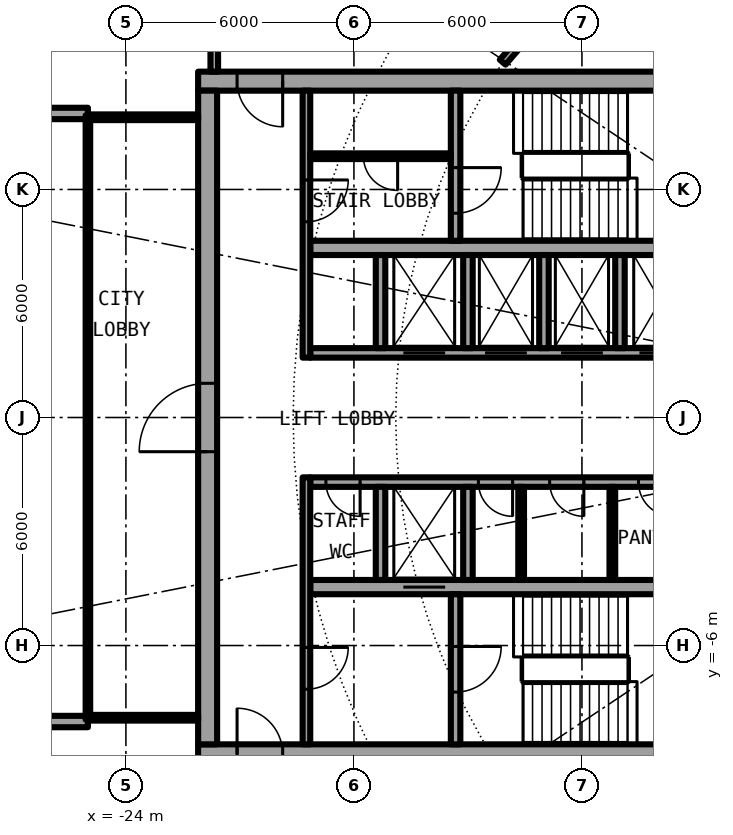
"""IFC4 building model, lengths in metres.
Left out: names, types, materials, properties, quantities, classifications, styles, units other than length and angle.
Written with IfcOpenShell. Run it as: python <this file> out.ifc"""

import sys

from ifc_helpers import new_model, si_unit, direction, frame, frame_2d, origin, place, context, subcontext, project, spatial, rectangle, extrude, element, fill, save


model = new_model("IFC4")
c1 = context("Model", 3, precision=1e-05, world=origin(), true_north=direction((0.0, 1.0)))
c2 = subcontext(c1, "Body", "Model", "MODEL_VIEW")
j1 = project(units=[si_unit("LENGTHUNIT", "METRE"), si_unit("PLANEANGLEUNIT", "RADIAN")], contexts=[c1])
p1 = place(None, origin())
s1 = spatial("IfcSite", under=j1, at=p1, CompositionType="ELEMENT")
p2 = place(p1, origin())
s2 = spatial("IfcBuilding", under=s1, at=p2, CompositionType="ELEMENT")
p3 = place(p2, frame((0.0, 0.0, 157.4)))
s3 = spatial("IfcBuildingStorey", under=s2, at=p3, CompositionType="ELEMENT", Elevation=157.4)
for number, where, z_axis, x_axis in (
    (1, (-25.0, 8.0, 0.0), (0.0, 0.0, 1.0), (-1.0, 0.0, 0.0)),
    (2, (-25.0, -8.0, 0.0), (0.0, 0.0, 1.0), (-1.0, 0.0, 0.0)),
):
    element("IfcWall", number, at=place(p3, frame(where, z_axis=z_axis, x_axis=x_axis)), inside=s3, PredefinedType="SOLIDWALL", context=c2, shape_type="SweptSolid", body=[
        extrude(rectangle(XDim=2.667, YDim=0.3, at=frame_2d((1.333, 0.0))), origin(), (0.0, 0.0, 1.0), 3.85),
    ])
p4 = place(p3, frame((-22.1, -8.85, 0.0), z_axis=(0.0, 0.0, 1.0), x_axis=(1.0, 0.0, 0.0)))
e3 = element("IfcWall", 3, at=p4, inside=s3, PredefinedType="SHEAR", context=c2, shape_type="SweptSolid", body=[
    extrude(rectangle(XDim=13.6, YDim=0.5, at=frame_2d((6.8, 0.0))), origin(), (0.0, 0.0, 1.0), 4.2),
])
p5 = place(p4, frame((1.025, 0.0, 0.0)))
e4 = element("IfcOpeningElement", 4, at=p5, cuts=e3, PredefinedType="OPENING", context=c2, shape_type="SweptSolid", body=[
    extrude(rectangle(XDim=1.2, YDim=2.3, at=frame_2d((0.6, 1.15))), frame((0.0, 0.26, 0.0), z_axis=(0.0, -1.0, 0.0), x_axis=(1.0, 0.0, 0.0)), (0.0, 0.0, 1.0), 0.52),
])
p6 = place(p3, frame((-8.5, 8.85, 0.0), z_axis=(0.0, 0.0, 1.0), x_axis=(-1.0, 0.0, 0.0)))
e5 = element("IfcWall", 5, at=p6, inside=s3, PredefinedType="SHEAR", context=c2, shape_type="SweptSolid", body=[
    extrude(rectangle(XDim=13.6, YDim=0.5, at=frame_2d((6.8, 0.0))), origin(), (0.0, 0.0, 1.0), 4.2),
])
p7 = place(p6, frame((11.375, 0.0, 0.0)))
e6 = element("IfcOpeningElement", 6, at=p7, cuts=e5, PredefinedType="OPENING", context=c2, shape_type="SweptSolid", body=[
    extrude(rectangle(XDim=1.2, YDim=2.3, at=frame_2d((0.6, 1.15))), frame((0.0, 0.26, 0.0), z_axis=(0.0, -1.0, 0.0), x_axis=(1.0, 0.0, 0.0)), (0.0, 0.0, 1.0), 0.52),
])
p8 = place(p3, frame((-21.85, -8.6, 0.0), z_axis=(0.0, 0.0, 1.0), x_axis=(0.0, 1.0, 0.0)))
e7 = element("IfcWall", 7, at=p8, inside=s3, PredefinedType="SHEAR", context=c2, shape_type="SweptSolid", body=[
    extrude(rectangle(XDim=17.2, YDim=0.5, at=frame_2d((8.6, 0.0))), origin(), (0.0, 0.0, 1.0), 4.2),
])
p9 = place(p8, frame((7.7, 0.0, 0.0)))
e8 = element("IfcOpeningElement", 8, at=p9, cuts=e7, PredefinedType="OPENING", context=c2, shape_type="SweptSolid", body=[
    extrude(rectangle(XDim=1.8, YDim=2.3, at=frame_2d((0.9, 1.15))), frame((0.0, 0.26, 0.0), z_axis=(0.0, -1.0, 0.0), x_axis=(1.0, 0.0, 0.0)), (0.0, 0.0, 1.0), 0.52),
])
p10 = place(p3, frame((-9.0, -1.7, 0.0), z_axis=(0.0, 0.0, 1.0), x_axis=(-1.0, 0.0, 0.0)))
e9 = element("IfcWall", 9, at=p10, inside=s3, PredefinedType="SHEAR", context=c2, shape_type="SweptSolid", body=[
    extrude(rectangle(XDim=10.15, YDim=0.25, at=frame_2d((5.075, 0.0))), origin(), (0.0, 0.0, 1.0), 4.2),
])
p11 = place(p10, frame((0.613, 0.0, 0.0)))
e10 = element("IfcOpeningElement", 10, at=p11, cuts=e9, PredefinedType="OPENING", context=c2, shape_type="SweptSolid", body=[
    extrude(rectangle(XDim=0.9, YDim=2.3, at=frame_2d((0.45, 1.15))), frame((0.0, 0.135, 0.0), z_axis=(0.0, -1.0, 0.0), x_axis=(1.0, 0.0, 0.0)), (0.0, 0.0, 1.0), 0.27),
])
p12 = place(p10, frame((2.95, 0.0, 0.0)))
e11 = element("IfcOpeningElement", 11, at=p12, cuts=e9, PredefinedType="OPENING", context=c2, shape_type="SweptSolid", body=[
    extrude(rectangle(XDim=0.9, YDim=2.3, at=frame_2d((0.45, 1.15))), frame((0.0, 0.135, 0.0), z_axis=(0.0, -1.0, 0.0), x_axis=(1.0, 0.0, 0.0)), (0.0, 0.0, 1.0), 0.27),
])
p13 = place(p10, frame((4.825, 0.0, 0.0)))
e12 = element("IfcOpeningElement", 12, at=p13, cuts=e9, PredefinedType="OPENING", context=c2, shape_type="SweptSolid", body=[
    extrude(rectangle(XDim=0.9, YDim=2.3, at=frame_2d((0.45, 1.15))), frame((0.0, 0.135, 0.0), z_axis=(0.0, -1.0, 0.0), x_axis=(1.0, 0.0, 0.0)), (0.0, 0.0, 1.0), 0.27),
])
p14 = place(p10, frame((8.837, 0.0, 0.0)))
e13 = element("IfcOpeningElement", 13, at=p14, cuts=e9, PredefinedType="OPENING", context=c2, shape_type="SweptSolid", body=[
    extrude(rectangle(XDim=0.9, YDim=2.3, at=frame_2d((0.45, 1.15))), frame((0.0, 0.135, 0.0), z_axis=(0.0, -1.0, 0.0), x_axis=(1.0, 0.0, 0.0)), (0.0, 0.0, 1.0), 0.27),
])
p15 = place(p3, frame((-9.0, -4.462, 0.0), z_axis=(0.0, 0.0, 1.0), x_axis=(-1.0, 0.0, 0.0)))
e14 = element("IfcWall", 14, at=p15, inside=s3, PredefinedType="SHEAR", context=c2, shape_type="SweptSolid", body=[
    extrude(rectangle(XDim=10.15, YDim=0.375, at=frame_2d((5.075, 0.0))), origin(), (0.0, 0.0, 1.0), 4.2),
])
p16 = place(p15, frame((6.6, 0.0, 0.0)))
e15 = element("IfcOpeningElement", 15, at=p16, cuts=e14, PredefinedType="OPENING", context=c2, shape_type="SweptSolid", body=[
    extrude(rectangle(XDim=1.1, YDim=2.3, at=frame_2d((0.55, 1.15))), frame((0.0, 0.198, 0.0), z_axis=(0.0, -1.0, 0.0), x_axis=(1.0, 0.0, 0.0)), (0.0, 0.0, 1.0), 0.395),
])
p17 = place(p3, frame((-15.325, -4.65, 0.0), z_axis=(0.0, 0.0, 1.0), x_axis=(0.0, -1.0, 0.0)))
e16 = element("IfcWall", 16, at=p17, inside=s3, PredefinedType="SHEAR", context=c2, shape_type="SweptSolid", body=[
    extrude(rectangle(XDim=3.95, YDim=0.25, at=frame_2d((1.975, 0.0))), origin(), (0.0, 0.0, 1.0), 4.2),
])
p18 = place(p17, frame((1.375, 0.0, 0.0)))
e17 = element("IfcOpeningElement", 17, at=p18, cuts=e16, PredefinedType="OPENING", context=c2, shape_type="SweptSolid", body=[
    extrude(rectangle(XDim=1.2, YDim=2.3, at=frame_2d((0.6, 1.15))), frame((0.0, 0.135, 0.0), z_axis=(0.0, -1.0, 0.0), x_axis=(1.0, 0.0, 0.0)), (0.0, 0.0, 1.0), 0.27),
])
for number, where, z_axis, x_axis in (
    (18, (-15.0, -1.825, 0.0), (0.0, 0.0, 1.0), (0.0, -1.0, 0.0)),
    (19, (-17.3, -1.825, 0.0), (0.0, 0.0, 1.0), (0.0, -1.0, 0.0)),
):
    element("IfcWall", number, at=place(p3, frame(where, z_axis=z_axis, x_axis=x_axis)), inside=s3, PredefinedType="SOLIDWALL", context=c2, shape_type="SweptSolid", body=[
        extrude(rectangle(XDim=2.45, YDim=0.25, at=frame_2d((1.225, 0.0))), origin(), (0.0, 0.0, 1.0), 3.85),
    ])
p19 = place(p3, frame((-19.25, -1.575, 0.0), z_axis=(0.0, 0.0, 1.0), x_axis=(0.0, -1.0, 0.0)))
e20 = element("IfcWall", 20, at=p19, inside=s3, PredefinedType="SOLIDWALL", context=c2, shape_type="SweptSolid", body=[
    extrude(rectangle(XDim=7.025, YDim=0.2, at=frame_2d((3.513, 0.0))), origin(), (0.0, 0.0, 1.0), 3.85),
])
p20 = place(p19, frame((4.475, 0.0, 0.0)))
e21 = element("IfcOpeningElement", 21, at=p20, cuts=e20, PredefinedType="OPENING", context=c2, shape_type="SweptSolid", body=[
    extrude(rectangle(XDim=1.1, YDim=2.3, at=frame_2d((0.55, 1.15))), frame((0.0, 0.11, 0.0), z_axis=(0.0, -1.0, 0.0), x_axis=(1.0, 0.0, 0.0)), (0.0, 0.0, 1.0), 0.22),
])
p21 = place(p3, frame((-9.0, 1.7, 0.0), z_axis=(0.0, 0.0, 1.0), x_axis=(-1.0, 0.0, 0.0)))
e22 = element("IfcWall", 22, at=p21, inside=s3, PredefinedType="SHEAR", context=c2, shape_type="SweptSolid", body=[
    extrude(rectangle(XDim=10.15, YDim=0.25, at=frame_2d((5.075, 0.0))), origin(), (0.0, 0.0, 1.0), 4.2),
])
p22 = place(p21, frame((0.387, 0.0, 0.0)))
e23 = element("IfcOpeningElement", 23, at=p22, cuts=e22, PredefinedType="OPENING", context=c2, shape_type="SweptSolid", body=[
    extrude(rectangle(XDim=1.1, YDim=2.3, at=frame_2d((0.55, 1.15))), frame((0.0, 0.135, 0.0), z_axis=(0.0, -1.0, 0.0), x_axis=(1.0, 0.0, 0.0)), (0.0, 0.0, 1.0), 0.27),
])
p23 = place(p21, frame((2.45, 0.0, 0.0)))
e24 = element("IfcOpeningElement", 24, at=p23, cuts=e22, PredefinedType="OPENING", context=c2, shape_type="SweptSolid", body=[
    extrude(rectangle(XDim=1.1, YDim=2.3, at=frame_2d((0.55, 1.15))), frame((0.0, 0.135, 0.0), z_axis=(0.0, -1.0, 0.0), x_axis=(1.0, 0.0, 0.0)), (0.0, 0.0, 1.0), 0.27),
])
p24 = place(p21, frame((4.45, 0.0, 0.0)))
e25 = element("IfcOpeningElement", 25, at=p24, cuts=e22, PredefinedType="OPENING", context=c2, shape_type="SweptSolid", body=[
    extrude(rectangle(XDim=1.1, YDim=2.3, at=frame_2d((0.55, 1.15))), frame((0.0, 0.135, 0.0), z_axis=(0.0, -1.0, 0.0), x_axis=(1.0, 0.0, 0.0)), (0.0, 0.0, 1.0), 0.27),
])
p25 = place(p21, frame((6.6, 0.0, 0.0)))
e26 = element("IfcOpeningElement", 26, at=p25, cuts=e22, PredefinedType="OPENING", context=c2, shape_type="SweptSolid", body=[
    extrude(rectangle(XDim=1.1, YDim=2.3, at=frame_2d((0.55, 1.15))), frame((0.0, 0.135, 0.0), z_axis=(0.0, -1.0, 0.0), x_axis=(1.0, 0.0, 0.0)), (0.0, 0.0, 1.0), 0.27),
])
p26 = place(p3, frame((-9.0, 4.462, 0.0), z_axis=(0.0, 0.0, 1.0), x_axis=(-1.0, 0.0, 0.0)))
e27 = element("IfcWall", 27, at=p26, inside=s3, PredefinedType="SHEAR", context=c2, shape_type="SweptSolid", body=[
    extrude(rectangle(XDim=10.15, YDim=0.375, at=frame_2d((5.075, 0.0))), origin(), (0.0, 0.0, 1.0), 4.2),
])
p27 = place(p3, frame((-15.325, 8.6, 0.0), z_axis=(0.0, 0.0, 1.0), x_axis=(0.0, -1.0, 0.0)))
e28 = element("IfcWall", 28, at=p27, inside=s3, PredefinedType="SHEAR", context=c2, shape_type="SweptSolid", body=[
    extrude(rectangle(XDim=3.95, YDim=0.25, at=frame_2d((1.975, 0.0))), origin(), (0.0, 0.0, 1.0), 4.2),
])
p28 = place(p27, frame((2.025, 0.0, 0.0)))
e29 = element("IfcOpeningElement", 29, at=p28, cuts=e28, PredefinedType="OPENING", context=c2, shape_type="SweptSolid", body=[
    extrude(rectangle(XDim=1.2, YDim=2.3, at=frame_2d((0.6, 1.15))), frame((0.0, 0.135, 0.0), z_axis=(0.0, -1.0, 0.0), x_axis=(1.0, 0.0, 0.0)), (0.0, 0.0, 1.0), 0.27),
])
for number, where, z_axis, x_axis in (
    (30, (-15.0, 1.825, 0.0), (0.0, 0.0, 1.0), (0.0, 1.0, 0.0)),
    (31, (-17.3, 1.825, 0.0), (0.0, 0.0, 1.0), (0.0, 1.0, 0.0)),
):
    element("IfcWall", number, at=place(p3, frame(where, z_axis=z_axis, x_axis=x_axis)), inside=s3, PredefinedType="SOLIDWALL", context=c2, shape_type="SweptSolid", body=[
        extrude(rectangle(XDim=2.45, YDim=0.25, at=frame_2d((1.225, 0.0))), origin(), (0.0, 0.0, 1.0), 3.85),
    ])
p29 = place(p3, frame((-19.25, 8.6, 0.0), z_axis=(0.0, 0.0, 1.0), x_axis=(0.0, -1.0, 0.0)))
e32 = element("IfcWall", 32, at=p29, inside=s3, PredefinedType="SOLIDWALL", context=c2, shape_type="SweptSolid", body=[
    extrude(rectangle(XDim=7.025, YDim=0.2, at=frame_2d((3.513, 0.0))), origin(), (0.0, 0.0, 1.0), 3.85),
])
p30 = place(p29, frame((2.35, 0.0, 0.0)))
e33 = element("IfcOpeningElement", 33, at=p30, cuts=e32, PredefinedType="OPENING", context=c2, shape_type="SweptSolid", body=[
    extrude(rectangle(XDim=1.1, YDim=2.3, at=frame_2d((0.55, 1.15))), frame((0.0, 0.11, 0.0), z_axis=(0.0, -1.0, 0.0), x_axis=(1.0, 0.0, 0.0)), (0.0, 0.0, 1.0), 0.22),
])
for number, where, z_axis, x_axis in (
    (34, (-11.0, 1.825, 0.0), (0.0, 0.0, 1.0), (0.0, 1.0, 0.0)),
    (35, (-13.0, 1.825, 0.0), (0.0, 0.0, 1.0), (0.0, 1.0, 0.0)),
):
    element("IfcWall", number, at=place(p3, frame(where, z_axis=z_axis, x_axis=x_axis)), inside=s3, PredefinedType="SOLIDWALL", context=c2, shape_type="SweptSolid", body=[
        extrude(rectangle(XDim=2.45, YDim=0.25, at=frame_2d((1.225, 0.0))), origin(), (0.0, 0.0, 1.0), 3.85),
    ])
for number, where, z_axis, x_axis in (
    (36, (-11.2, -1.825, 0.0), (0.0, 0.0, 1.0), (0.0, -1.0, 0.0)),
    (37, (-13.6, -1.825, 0.0), (0.0, 0.0, 1.0), (0.0, -1.0, 0.0)),
):
    element("IfcWall", number, at=place(p3, frame(where, z_axis=z_axis, x_axis=x_axis)), inside=s3, PredefinedType="PARTITIONING", context=c2, shape_type="SweptSolid", body=[
        extrude(rectangle(XDim=2.45, YDim=0.15, at=frame_2d((1.225, 0.0))), origin(), (0.0, 0.0, 1.0), 3.85),
    ])
p31 = place(p3, frame((-15.45, 6.875, 0.0), z_axis=(0.0, 0.0, 1.0), x_axis=(-1.0, 0.0, 0.0)))
e38 = element("IfcWall", 38, at=p31, inside=s3, PredefinedType="PARTITIONING", context=c2, shape_type="SweptSolid", body=[
    extrude(rectangle(XDim=3.7, YDim=0.15, at=frame_2d((1.85, 0.0))), origin(), (0.0, 0.0, 1.0), 3.85),
])
p32 = place(p31, frame((1.4, 0.0, 0.0)))
e39 = element("IfcOpeningElement", 39, at=p32, cuts=e38, PredefinedType="OPENING", context=c2, shape_type="SweptSolid", body=[
    extrude(rectangle(XDim=0.9, YDim=2.3, at=frame_2d((0.45, 1.15))), frame((0.0, 0.085, 0.0), z_axis=(0.0, -1.0, 0.0), x_axis=(1.0, 0.0, 0.0)), (0.0, 0.0, 1.0), 0.17),
])
for number, where, z_axis, x_axis in (
    (40, (-22.1, 7.9, 0.0), (0.0, 0.0, 1.0), (-1.0, 0.0, 0.0)),
    (41, (-22.1, -7.9, 0.0), (0.0, 0.0, 1.0), (-1.0, 0.0, 0.0)),
):
    element("IfcWall", number, at=place(p3, frame(where, z_axis=z_axis, x_axis=x_axis)), inside=s3, PredefinedType="PARTITIONING", context=c2, shape_type="SweptSolid", body=[
        extrude(rectangle(XDim=2.84, YDim=0.15, at=frame_2d((1.42, 0.0))), origin(), (0.0, 0.0, 1.0), 3.85),
    ])
p33 = place(p3, frame((-25.0, 7.95, 0.0), z_axis=(0.0, 0.0, 1.0), x_axis=(0.0, -1.0, 0.0)))
e42 = element("IfcWall", 42, at=p33, inside=s3, PredefinedType="PARTITIONING", context=c2, shape_type="SweptSolid", body=[
    extrude(rectangle(XDim=15.9, YDim=0.12, at=frame_2d((7.95, 0.0))), origin(), (0.0, 0.0, 1.0), 3.85),
])
p34 = place(p33, frame((0.95, 0.0, 0.1)))
e43 = element("IfcOpeningElement", 43, at=p34, cuts=e42, PredefinedType="OPENING", context=c2, shape_type="SweptSolid", body=[
    extrude(rectangle(XDim=14.0, YDim=3.5, at=frame_2d((7.0, 1.75))), frame((0.0, 0.07, 0.0), z_axis=(0.0, -1.0, 0.0), x_axis=(1.0, 0.0, 0.0)), (0.0, 0.0, 1.0), 0.14),
])
p35 = place(p3, frame((-14.086, 9.35, 0.0), z_axis=(0.0, 0.0, 1.0), x_axis=(0.653273870261, 0.757121687996, 0.0)))
e44 = element("IfcWall", 44, at=p35, inside=s3, PredefinedType="PARTITIONING", context=c2, shape_type="SweptSolid", body=[
    extrude(rectangle(XDim=4.189, YDim=0.2, at=frame_2d((2.095, 0.0))), origin(), (0.0, 0.0, 1.0), 3.85),
])
p36 = place(p35, frame((1.621, 0.0, 0.0)))
e45 = element("IfcOpeningElement", 45, at=p36, cuts=e44, PredefinedType="OPENING", context=c2, shape_type="SweptSolid", body=[
    extrude(rectangle(XDim=1.0, YDim=2.3, at=frame_2d((0.5, 1.15))), frame((0.0, 0.11, 0.0), z_axis=(0.0, -1.0, 0.0), x_axis=(1.0, 0.0, 0.0)), (0.0, 0.0, 1.0), 0.22),
])
p37 = place(p3, frame((-21.675, 9.1, 0.0), z_axis=(0.0, 0.0, 1.0), x_axis=(0.0, 1.0, 0.0)))
e46 = element("IfcWall", 46, at=p37, inside=s3, PredefinedType="PARTITIONING", context=c2, shape_type="SweptSolid", body=[
    extrude(rectangle(XDim=1.75, YDim=0.2, at=frame_2d((0.875, 0.0))), origin(), (0.0, 0.0, 1.0), 3.85),
])
p38 = place(p16, origin())
e47 = element("IfcDoor", 47, at=p38, inside=s3, OperationType="DOUBLE_DOOR_SLIDING", PredefinedType="DOOR", context=c2, shape_type="SweptSolid", body=[
    extrude(rectangle(XDim=1.1, YDim=2.3, at=frame_2d((0.55, 1.15))), frame((0.0, 0.025, 0.0), z_axis=(0.0, -1.0, 0.0), x_axis=(1.0, 0.0, 0.0)), (0.0, 0.0, 1.0), 0.05),
])
fill(e15, e47)
p39 = place(p22, origin())
e48 = element("IfcDoor", 48, at=p39, inside=s3, OperationType="DOUBLE_DOOR_SLIDING", PredefinedType="DOOR", context=c2, shape_type="SweptSolid", body=[
    extrude(rectangle(XDim=1.1, YDim=2.3, at=frame_2d((0.55, 1.15))), frame((0.0, 0.025, 0.0), z_axis=(0.0, -1.0, 0.0), x_axis=(1.0, 0.0, 0.0)), (0.0, 0.0, 1.0), 0.05),
])
fill(e23, e48)
p40 = place(p23, origin())
e49 = element("IfcDoor", 49, at=p40, inside=s3, OperationType="DOUBLE_DOOR_SLIDING", PredefinedType="DOOR", context=c2, shape_type="SweptSolid", body=[
    extrude(rectangle(XDim=1.1, YDim=2.3, at=frame_2d((0.55, 1.15))), frame((0.0, 0.025, 0.0), z_axis=(0.0, -1.0, 0.0), x_axis=(1.0, 0.0, 0.0)), (0.0, 0.0, 1.0), 0.05),
])
fill(e24, e49)
p41 = place(p24, origin())
e50 = element("IfcDoor", 50, at=p41, inside=s3, OperationType="DOUBLE_DOOR_SLIDING", PredefinedType="DOOR", context=c2, shape_type="SweptSolid", body=[
    extrude(rectangle(XDim=1.1, YDim=2.3, at=frame_2d((0.55, 1.15))), frame((0.0, 0.025, 0.0), z_axis=(0.0, -1.0, 0.0), x_axis=(1.0, 0.0, 0.0)), (0.0, 0.0, 1.0), 0.05),
])
fill(e25, e50)
p42 = place(p25, origin())
e51 = element("IfcDoor", 51, at=p42, inside=s3, OperationType="DOUBLE_DOOR_SLIDING", PredefinedType="DOOR", context=c2, shape_type="SweptSolid", body=[
    extrude(rectangle(XDim=1.1, YDim=2.3, at=frame_2d((0.55, 1.15))), frame((0.0, 0.025, 0.0), z_axis=(0.0, -1.0, 0.0), x_axis=(1.0, 0.0, 0.0)), (0.0, 0.0, 1.0), 0.05),
])
fill(e26, e51)
p43 = place(p11, origin())
e52 = element("IfcDoor", 52, at=p43, inside=s3, OperationType="SINGLE_SWING_RIGHT", PredefinedType="DOOR", context=c2, shape_type="SweptSolid", body=[
    extrude(rectangle(XDim=0.9, YDim=2.3, at=frame_2d((0.45, 1.15))), frame((0.0, 0.025, 0.0), z_axis=(0.0, -1.0, 0.0), x_axis=(1.0, 0.0, 0.0)), (0.0, 0.0, 1.0), 0.05),
])
fill(e10, e52)
p44 = place(p12, origin())
e53 = element("IfcDoor", 53, at=p44, inside=s3, OperationType="SINGLE_SWING_RIGHT", PredefinedType="DOOR", context=c2, shape_type="SweptSolid", body=[
    extrude(rectangle(XDim=0.9, YDim=2.3, at=frame_2d((0.45, 1.15))), frame((0.0, 0.025, 0.0), z_axis=(0.0, -1.0, 0.0), x_axis=(1.0, 0.0, 0.0)), (0.0, 0.0, 1.0), 0.05),
])
fill(e11, e53)
p45 = place(p13, origin())
e54 = element("IfcDoor", 54, at=p45, inside=s3, OperationType="SINGLE_SWING_LEFT", PredefinedType="DOOR", context=c2, shape_type="SweptSolid", body=[
    extrude(rectangle(XDim=0.9, YDim=2.3, at=frame_2d((0.45, 1.15))), frame((0.0, 0.025, 0.0), z_axis=(0.0, -1.0, 0.0), x_axis=(1.0, 0.0, 0.0)), (0.0, 0.0, 1.0), 0.05),
])
fill(e12, e54)
p46 = place(p14, origin())
e55 = element("IfcDoor", 55, at=p46, inside=s3, OperationType="SINGLE_SWING_LEFT", PredefinedType="DOOR", context=c2, shape_type="SweptSolid", body=[
    extrude(rectangle(XDim=0.9, YDim=2.3, at=frame_2d((0.45, 1.15))), frame((0.0, 0.025, 0.0), z_axis=(0.0, -1.0, 0.0), x_axis=(1.0, 0.0, 0.0)), (0.0, 0.0, 1.0), 0.05),
])
fill(e13, e55)
p47 = place(p32, origin())
e56 = element("IfcDoor", 56, at=p47, inside=s3, OperationType="SINGLE_SWING_LEFT", PredefinedType="DOOR", context=c2, shape_type="SweptSolid", body=[
    extrude(rectangle(XDim=0.9, YDim=2.3, at=frame_2d((0.45, 1.15))), frame((0.0, 0.025, 0.0), z_axis=(0.0, -1.0, 0.0), x_axis=(1.0, 0.0, 0.0)), (0.0, 0.0, 1.0), 0.05),
])
fill(e39, e56)
p48 = place(p18, origin())
e57 = element("IfcDoor", 57, at=p48, inside=s3, OperationType="SINGLE_SWING_LEFT", PredefinedType="DOOR", context=c2, shape_type="SweptSolid", body=[
    extrude(rectangle(XDim=1.2, YDim=2.3, at=frame_2d((0.6, 1.15))), frame((0.0, 0.025, 0.0), z_axis=(0.0, -1.0, 0.0), x_axis=(1.0, 0.0, 0.0)), (0.0, 0.0, 1.0), 0.05),
])
fill(e17, e57)
p49 = place(p28, origin())
e58 = element("IfcDoor", 58, at=p49, inside=s3, OperationType="SINGLE_SWING_LEFT", PredefinedType="DOOR", context=c2, shape_type="SweptSolid", body=[
    extrude(rectangle(XDim=1.2, YDim=2.3, at=frame_2d((0.6, 1.15))), frame((0.0, 0.025, 0.0), z_axis=(0.0, -1.0, 0.0), x_axis=(1.0, 0.0, 0.0)), (0.0, 0.0, 1.0), 0.05),
])
fill(e29, e58)
p50 = place(p20, origin())
e59 = element("IfcDoor", 59, at=p50, inside=s3, OperationType="SINGLE_SWING_LEFT", PredefinedType="DOOR", context=c2, shape_type="SweptSolid", body=[
    extrude(rectangle(XDim=1.1, YDim=2.3, at=frame_2d((0.55, 1.15))), frame((0.0, 0.025, 0.0), z_axis=(0.0, -1.0, 0.0), x_axis=(1.0, 0.0, 0.0)), (0.0, 0.0, 1.0), 0.05),
])
fill(e21, e59)
p51 = place(p30, origin())
e60 = element("IfcDoor", 60, at=p51, inside=s3, OperationType="SINGLE_SWING_RIGHT", PredefinedType="DOOR", context=c2, shape_type="SweptSolid", body=[
    extrude(rectangle(XDim=1.1, YDim=2.3, at=frame_2d((0.55, 1.15))), frame((0.0, 0.025, 0.0), z_axis=(0.0, -1.0, 0.0), x_axis=(1.0, 0.0, 0.0)), (0.0, 0.0, 1.0), 0.05),
])
fill(e33, e60)
p52 = place(p5, origin())
e61 = element("IfcDoor", 61, at=p52, inside=s3, OperationType="SINGLE_SWING_RIGHT", PredefinedType="DOOR", context=c2, shape_type="SweptSolid", body=[
    extrude(rectangle(XDim=1.2, YDim=2.3, at=frame_2d((0.6, 1.15))), frame((0.0, 0.025, 0.0), z_axis=(0.0, -1.0, 0.0), x_axis=(1.0, 0.0, 0.0)), (0.0, 0.0, 1.0), 0.05),
])
fill(e4, e61)
p53 = place(p7, origin())
e62 = element("IfcDoor", 62, at=p53, inside=s3, OperationType="SINGLE_SWING_LEFT", PredefinedType="DOOR", context=c2, shape_type="SweptSolid", body=[
    extrude(rectangle(XDim=1.2, YDim=2.3, at=frame_2d((0.6, 1.15))), frame((0.0, 0.025, 0.0), z_axis=(0.0, -1.0, 0.0), x_axis=(1.0, 0.0, 0.0)), (0.0, 0.0, 1.0), 0.05),
])
fill(e6, e62)
p54 = place(p9, origin())
e63 = element("IfcDoor", 63, at=p54, inside=s3, OperationType="SINGLE_SWING_LEFT", PredefinedType="DOOR", context=c2, shape_type="SweptSolid", body=[
    extrude(rectangle(XDim=1.8, YDim=2.3, at=frame_2d((0.9, 1.15))), frame((0.0, 0.025, 0.0), z_axis=(0.0, -1.0, 0.0), x_axis=(1.0, 0.0, 0.0)), (0.0, 0.0, 1.0), 0.05),
])
fill(e8, e63)
p55 = place(p34, origin())
e64 = element("IfcWindow", 64, at=p55, inside=s3, PartitioningType="SINGLE_PANEL", PredefinedType="WINDOW", context=c2, shape_type="SweptSolid", body=[
    extrude(rectangle(XDim=14.0, YDim=3.5, at=frame_2d((7.0, 1.75))), frame((0.0, 0.03, 0.0), z_axis=(0.0, -1.0, 0.0), x_axis=(1.0, 0.0, 0.0)), (0.0, 0.0, 1.0), 0.06),
])
fill(e43, e64)
save(model, sys.argv[1])
